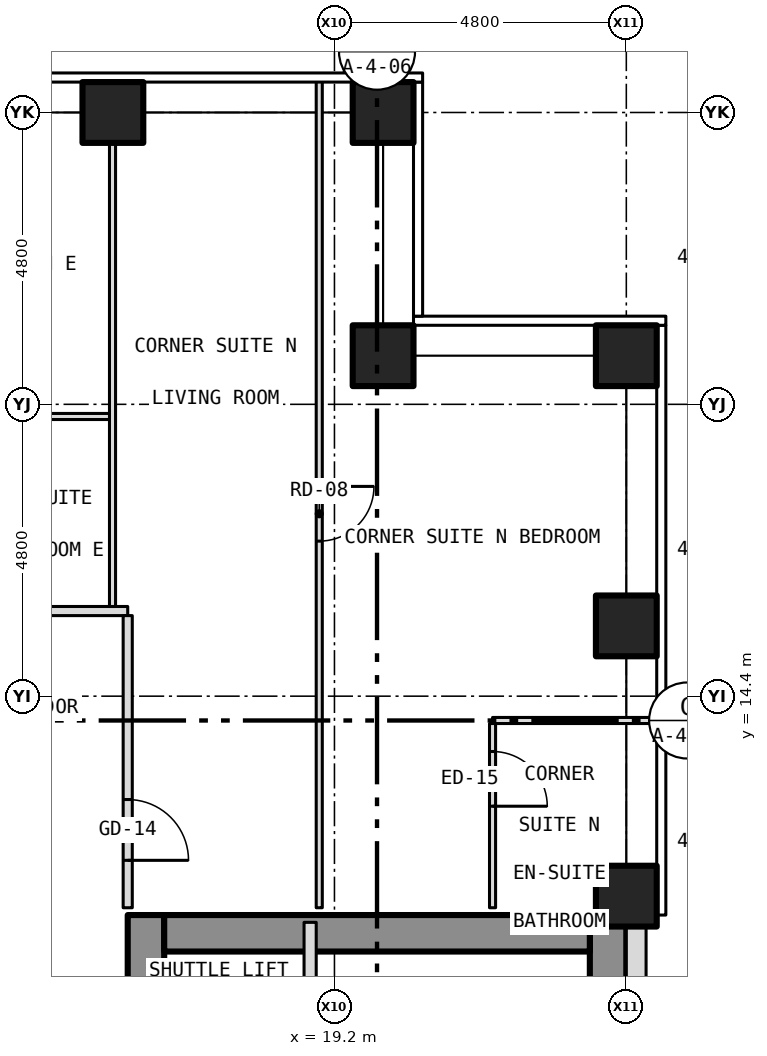
"""IFC4 building model, lengths in metres.
Left out: names, types, materials, properties, quantities, classifications, styles, units other than length and angle.
Written with IfcOpenShell. Run it as: python <this file> out.ifc"""

import sys

from ifc_helpers import new_model, si_unit, direction, frame, frame_2d, origin, origin_2d, place, context, subcontext, project, spatial, rectangle, hollow_rectangle, extrude, element, fill, save


model = new_model("IFC4")
c1 = context("Model", 3, precision=1e-05, world=origin(), true_north=direction((0.0, 1.0)))
c2 = subcontext(c1, "Body", "Model", "MODEL_VIEW")
j1 = project(units=[si_unit("LENGTHUNIT", "METRE"), si_unit("PLANEANGLEUNIT", "RADIAN")], contexts=[c1])
p1 = place(None, origin())
s1 = spatial("IfcSite", under=j1, at=p1, CompositionType="ELEMENT")
p2 = place(p1, origin())
s2 = spatial("IfcBuilding", under=s1, at=p2, CompositionType="ELEMENT")
p3 = place(p2, frame((0.0, 0.0, 46.0)))
s3 = spatial("IfcBuildingStorey", under=s2, at=p3, CompositionType="ELEMENT", Elevation=46.0)
for number, where, z_axis, x_axis in (
    (1, (15.556, 24.0, -0.15), (0.0, 0.0, 1.0), (1.0, 0.0, 0.0)),
    (2, (20.0, 24.0, -0.15), (0.0, 0.0, 1.0), (1.0, 0.0, 0.0)),
    (3, (24.0, 11.111, -0.15), (0.0, 0.0, 1.0), (1.0, 0.0, 0.0)),
    (4, (24.0, 15.556, -0.15), (0.0, 0.0, 1.0), (1.0, 0.0, 0.0)),
    (5, (24.0, 20.0, -0.15), (0.0, 0.0, 1.0), (1.0, 0.0, 0.0)),
    (6, (20.0, 20.0, -0.15), (0.0, 0.0, 1.0), (1.0, 0.0, 0.0)),
):
    element("IfcColumn", number, at=place(p3, frame(where, z_axis=z_axis, x_axis=x_axis)), inside=s3, PredefinedType="COLUMN", context=c2, shape_type="SweptSolid", body=[
        extrude(hollow_rectangle(XDim=1.0, YDim=1.0, WallThickness=0.06, at=origin_2d()), origin(), (0.0, 0.0, 1.0), 3.5),
    ])
p4 = place(p3, frame((16.1, -10.8, 0.0), z_axis=(0.0, 0.0, 1.0), x_axis=(0.0, 1.0, 0.0)))
e7 = element("IfcWall", 7, at=p4, inside=s3, PredefinedType="SHEAR", context=c2, shape_type="SweptSolid", body=[
    extrude(rectangle(XDim=21.6, YDim=0.6, at=frame_2d((10.8, 0.0))), origin(), (0.0, 0.0, 1.0), 3.25),
])
p5 = place(p4, frame((9.4, 0.0, 0.0)))
e8 = element("IfcOpeningElement", 8, at=p5, cuts=e7, PredefinedType="OPENING", context=c2, shape_type="SweptSolid", body=[
    extrude(rectangle(XDim=1.1, YDim=2.1, at=frame_2d((0.55, 1.05))), frame((0.0, 0.312, 0.0), z_axis=(0.0, -1.0, 0.0), x_axis=(1.0, 0.0, 0.0)), (0.0, 0.0, 1.0), 0.624),
])
p6 = place(p4, frame((11.5, 0.0, 0.0)))
e9 = element("IfcOpeningElement", 9, at=p6, cuts=e7, PredefinedType="OPENING", context=c2, shape_type="SweptSolid", body=[
    extrude(rectangle(XDim=1.1, YDim=2.1, at=frame_2d((0.55, 1.05))), frame((0.0, 0.312, 0.0), z_axis=(0.0, -1.0, 0.0), x_axis=(1.0, 0.0, 0.0)), (0.0, 0.0, 1.0), 0.624),
])
p7 = place(p4, frame((13.6, 0.0, 0.0)))
e10 = element("IfcOpeningElement", 10, at=p7, cuts=e7, PredefinedType="OPENING", context=c2, shape_type="SweptSolid", body=[
    extrude(rectangle(XDim=1.1, YDim=2.1, at=frame_2d((0.55, 1.05))), frame((0.0, 0.312, 0.0), z_axis=(0.0, -1.0, 0.0), x_axis=(1.0, 0.0, 0.0)), (0.0, 0.0, 1.0), 0.624),
])
p8 = place(p4, frame((15.7, 0.0, 0.0)))
e11 = element("IfcOpeningElement", 11, at=p8, cuts=e7, PredefinedType="OPENING", context=c2, shape_type="SweptSolid", body=[
    extrude(rectangle(XDim=1.1, YDim=2.1, at=frame_2d((0.55, 1.05))), frame((0.0, 0.312, 0.0), z_axis=(0.0, -1.0, 0.0), x_axis=(1.0, 0.0, 0.0)), (0.0, 0.0, 1.0), 0.624),
])
p9 = place(p4, frame((17.8, 0.0, 0.0)))
e12 = element("IfcOpeningElement", 12, at=p9, cuts=e7, PredefinedType="OPENING", context=c2, shape_type="SweptSolid", body=[
    extrude(rectangle(XDim=1.1, YDim=2.1, at=frame_2d((0.55, 1.05))), frame((0.0, 0.312, 0.0), z_axis=(0.0, -1.0, 0.0), x_axis=(1.0, 0.0, 0.0)), (0.0, 0.0, 1.0), 0.624),
])
p10 = place(p4, frame((5.642, 0.0, 0.0)))
e13 = element("IfcOpeningElement", 13, at=p10, cuts=e7, PredefinedType="OPENING", context=c2, shape_type="SweptSolid", body=[
    extrude(rectangle(XDim=1.1, YDim=2.1, at=frame_2d((0.55, 1.05))), frame((0.0, 0.312, 0.0), z_axis=(0.0, -1.0, 0.0), x_axis=(1.0, 0.0, 0.0)), (0.0, 0.0, 1.0), 0.624),
])
p11 = place(p4, frame((7.5, 0.0, 0.0)))
e14 = element("IfcOpeningElement", 14, at=p11, cuts=e7, PredefinedType="OPENING", context=c2, shape_type="SweptSolid", body=[
    extrude(rectangle(XDim=1.1, YDim=2.1, at=frame_2d((0.55, 1.05))), frame((0.0, 0.312, 0.0), z_axis=(0.0, -1.0, 0.0), x_axis=(1.0, 0.0, 0.0)), (0.0, 0.0, 1.0), 0.624),
])
p12 = place(p3, frame((23.7, -10.8, 0.0), z_axis=(0.0, 0.0, 1.0), x_axis=(0.0, 1.0, 0.0)))
e15 = element("IfcWall", 15, at=p12, inside=s3, PredefinedType="SHEAR", context=c2, shape_type="SweptSolid", body=[
    extrude(rectangle(XDim=21.6, YDim=0.6, at=frame_2d((10.8, 0.0))), origin(), (0.0, 0.0, 1.0), 3.25),
])
p13 = place(p3, frame((16.4, 10.5, 0.0), z_axis=(0.0, 0.0, 1.0), x_axis=(1.0, 0.0, 0.0)))
e16 = element("IfcWall", 16, at=p13, inside=s3, PredefinedType="SHEAR", context=c2, shape_type="SweptSolid", body=[
    extrude(rectangle(XDim=7.0, YDim=0.6, at=frame_2d((3.5, 0.0))), origin(), (0.0, 0.0, 1.0), 3.25),
])
p14 = place(p3, frame((24.163, -10.8, 0.0), z_axis=(0.0, 0.0, 1.0), x_axis=(0.0, 1.0, 0.0)))
e17 = element("IfcWall", 17, at=p14, inside=s3, PredefinedType="SOLIDWALL", context=c2, shape_type="SweptSolid", body=[
    extrude(rectangle(XDim=21.6, YDim=0.325, at=frame_2d((10.8, 0.0))), origin(), (0.0, 0.0, 1.0), 3.5),
])
p15 = place(p14, frame((2.95, 0.0, 1.0)))
e18 = element("IfcOpeningElement", 18, at=p15, cuts=e17, PredefinedType="OPENING", context=c2, shape_type="SweptSolid", body=[
    extrude(rectangle(XDim=0.6, YDim=1.5, at=frame_2d((0.3, 0.75))), frame((0.0, 0.175, 0.0), z_axis=(0.0, -1.0, 0.0), x_axis=(1.0, 0.0, 0.0)), (0.0, 0.0, 1.0), 0.349),
])
p16 = place(p3, frame((21.8, 14.0, 0.0), z_axis=(0.0, 0.0, 1.0), x_axis=(1.0, 0.0, 0.0)))
e19 = element("IfcWall", 19, at=p16, inside=s3, PredefinedType="PARTITIONING", context=c2, shape_type="SweptSolid", body=[
    extrude(rectangle(XDim=2.73, YDim=0.1, at=frame_2d((1.365, 0.0))), origin(), (0.0, 0.0, 1.0), 3.35),
])
p17 = place(p3, frame((-15.8, 15.8, 0.0), z_axis=(0.0, 0.0, 1.0), x_axis=(1.0, 0.0, 0.0)))
e20 = element("IfcWall", 20, at=p17, inside=s3, PredefinedType="PARTITIONING", context=c2, shape_type="SweptSolid", body=[
    extrude(rectangle(XDim=31.6, YDim=0.15, at=frame_2d((15.8, 0.0))), origin(), (0.0, 0.0, 1.0), 3.35),
])
p18 = place(p17, frame((3.067, 0.0, 0.0)))
e21 = element("IfcOpeningElement", 21, at=p18, cuts=e20, PredefinedType="OPENING", context=c2, shape_type="SweptSolid", body=[
    extrude(rectangle(XDim=1.0, YDim=2.1, at=frame_2d((0.5, 1.05))), frame((0.0, 0.087, 0.0), z_axis=(0.0, -1.0, 0.0), x_axis=(1.0, 0.0, 0.0)), (0.0, 0.0, 1.0), 0.174),
])
p19 = place(p17, frame((6.189, 0.0, 0.0)))
e22 = element("IfcOpeningElement", 22, at=p19, cuts=e20, PredefinedType="OPENING", context=c2, shape_type="SweptSolid", body=[
    extrude(rectangle(XDim=1.0, YDim=2.1, at=frame_2d((0.5, 1.05))), frame((0.0, 0.087, 0.0), z_axis=(0.0, -1.0, 0.0), x_axis=(1.0, 0.0, 0.0)), (0.0, 0.0, 1.0), 0.174),
])
p20 = place(p17, frame((15.311, 0.0, 0.0)))
e23 = element("IfcOpeningElement", 23, at=p20, cuts=e20, PredefinedType="OPENING", context=c2, shape_type="SweptSolid", body=[
    extrude(rectangle(XDim=1.0, YDim=2.1, at=frame_2d((0.5, 1.05))), frame((0.0, 0.087, 0.0), z_axis=(0.0, -1.0, 0.0), x_axis=(1.0, 0.0, 0.0)), (0.0, 0.0, 1.0), 0.174),
])
p21 = place(p17, frame((21.977, 0.0, 0.0)))
e24 = element("IfcOpeningElement", 24, at=p21, cuts=e20, PredefinedType="OPENING", context=c2, shape_type="SweptSolid", body=[
    extrude(rectangle(XDim=1.0, YDim=2.1, at=frame_2d((0.5, 1.05))), frame((0.0, 0.087, 0.0), z_axis=(0.0, -1.0, 0.0), x_axis=(1.0, 0.0, 0.0)), (0.0, 0.0, 1.0), 0.174),
])
p22 = place(p17, frame((27.534, 0.0, 0.0)))
e25 = element("IfcOpeningElement", 25, at=p22, cuts=e20, PredefinedType="OPENING", context=c2, shape_type="SweptSolid", body=[
    extrude(rectangle(XDim=1.0, YDim=2.1, at=frame_2d((0.5, 1.05))), frame((0.0, 0.087, 0.0), z_axis=(0.0, -1.0, 0.0), x_axis=(1.0, 0.0, 0.0)), (0.0, 0.0, 1.0), 0.174),
])
p23 = place(p3, frame((13.35, 19.0, 0.0), z_axis=(0.0, 0.0, 1.0), x_axis=(1.0, 0.0, 0.0)))
e26 = element("IfcWall", 26, at=p23, inside=s3, PredefinedType="PARTITIONING", context=c2, shape_type="SweptSolid", body=[
    extrude(rectangle(XDim=2.2, YDim=0.1, at=frame_2d((1.1, 0.0))), origin(), (0.0, 0.0, 1.0), 3.35),
])
p24 = place(p3, frame((15.55, 15.875, 0.0), z_axis=(0.0, 0.0, 1.0), x_axis=(0.0, 1.0, 0.0)))
e27 = element("IfcWall", 27, at=p24, inside=s3, PredefinedType="PARTITIONING", context=c2, shape_type="SweptSolid", body=[
    extrude(rectangle(XDim=8.005, YDim=0.1, at=frame_2d((4.002, 0.0))), origin(), (0.0, 0.0, 1.0), 3.35),
])
p25 = place(p3, frame((15.8, 10.92, 0.0), z_axis=(0.0, 0.0, 1.0), x_axis=(0.0, 1.0, 0.0)))
e28 = element("IfcWall", 28, at=p25, inside=s3, PredefinedType="PARTITIONING", context=c2, shape_type="SweptSolid", body=[
    extrude(rectangle(XDim=4.805, YDim=0.15, at=frame_2d((2.403, 0.0))), origin(), (0.0, 0.0, 1.0), 3.35),
])
p26 = place(p25, frame((0.78, 0.0, 0.0)))
e29 = element("IfcOpeningElement", 29, at=p26, cuts=e28, PredefinedType="OPENING", context=c2, shape_type="SweptSolid", body=[
    extrude(rectangle(XDim=1.0, YDim=2.1, at=frame_2d((0.5, 1.05))), frame((0.0, 0.087, 0.0), z_axis=(0.0, -1.0, 0.0), x_axis=(1.0, 0.0, 0.0)), (0.0, 0.0, 1.0), 0.174),
])
p27 = place(p3, frame((18.8, -1.8, 0.0), z_axis=(0.0, 0.0, 1.0), x_axis=(0.0, 1.0, 0.0)))
e30 = element("IfcWall", 30, at=p27, inside=s3, PredefinedType="PARTITIONING", context=c2, shape_type="SweptSolid", body=[
    extrude(rectangle(XDim=12.48, YDim=0.2, at=frame_2d((6.24, 0.0))), origin(), (0.0, 0.0, 1.0), 3.25),
])
p28 = place(p3, frame((18.95, 10.92, 0.0), z_axis=(0.0, 0.0, 1.0), x_axis=(0.0, 1.0, 0.0)))
e31 = element("IfcWall", 31, at=p28, inside=s3, PredefinedType="PARTITIONING", context=c2, shape_type="SweptSolid", body=[
    extrude(rectangle(XDim=13.61, YDim=0.1, at=frame_2d((6.805, 0.0))), origin(), (0.0, 0.0, 1.0), 3.35),
])
p29 = place(p28, frame((6.03, 0.0, 0.0)))
e32 = element("IfcOpeningElement", 32, at=p29, cuts=e31, PredefinedType="OPENING", context=c2, shape_type="SweptSolid", body=[
    extrude(rectangle(XDim=0.9, YDim=2.1, at=frame_2d((0.45, 1.05))), frame((0.0, 0.062, 0.0), z_axis=(0.0, -1.0, 0.0), x_axis=(1.0, 0.0, 0.0)), (0.0, 0.0, 1.0), 0.124),
])
p30 = place(p3, frame((21.8, 10.92, 0.0), z_axis=(0.0, 0.0, 1.0), x_axis=(0.0, 1.0, 0.0)))
e33 = element("IfcWall", 33, at=p30, inside=s3, PredefinedType="PARTITIONING", context=c2, shape_type="SweptSolid", body=[
    extrude(rectangle(XDim=3.03, YDim=0.1, at=frame_2d((1.515, 0.0))), origin(), (0.0, 0.0, 1.0), 3.35),
])
p31 = place(p30, frame((1.67, 0.0, 0.0)))
e34 = element("IfcOpeningElement", 34, at=p31, cuts=e33, PredefinedType="OPENING", context=c2, shape_type="SweptSolid", body=[
    extrude(rectangle(XDim=0.9, YDim=2.1, at=frame_2d((0.45, 1.05))), frame((0.0, 0.062, 0.0), z_axis=(0.0, -1.0, 0.0), x_axis=(1.0, 0.0, 0.0)), (0.0, 0.0, 1.0), 0.124),
])
p32 = place(p26, origin())
e35 = element("IfcDoor", 35, at=p32, inside=s3, OperationType="SINGLE_SWING_LEFT", PredefinedType="DOOR", context=c2, shape_type="SweptSolid", body=[
    extrude(rectangle(XDim=1.0, YDim=2.1, at=frame_2d((0.5, 1.05))), frame((0.0, 0.025, 0.0), z_axis=(0.0, -1.0, 0.0), x_axis=(1.0, 0.0, 0.0)), (0.0, 0.0, 1.0), 0.05),
])
fill(e29, e35)
p33 = place(p29, origin())
e36 = element("IfcDoor", 36, at=p33, inside=s3, OperationType="SINGLE_SWING_RIGHT", PredefinedType="DOOR", context=c2, shape_type="SweptSolid", body=[
    extrude(rectangle(XDim=0.9, YDim=2.1, at=frame_2d((0.45, 1.05))), frame((0.0, 0.025, 0.0), z_axis=(0.0, -1.0, 0.0), x_axis=(1.0, 0.0, 0.0)), (0.0, 0.0, 1.0), 0.05),
])
fill(e32, e36)
p34 = place(p31, origin())
e37 = element("IfcDoor", 37, at=p34, inside=s3, OperationType="SINGLE_SWING_LEFT", PredefinedType="DOOR", context=c2, shape_type="SweptSolid", body=[
    extrude(rectangle(XDim=0.9, YDim=2.1, at=frame_2d((0.45, 1.05))), frame((0.0, 0.025, 0.0), z_axis=(0.0, -1.0, 0.0), x_axis=(1.0, 0.0, 0.0)), (0.0, 0.0, 1.0), 0.05),
])
fill(e34, e37)
save(model, sys.argv[1])
